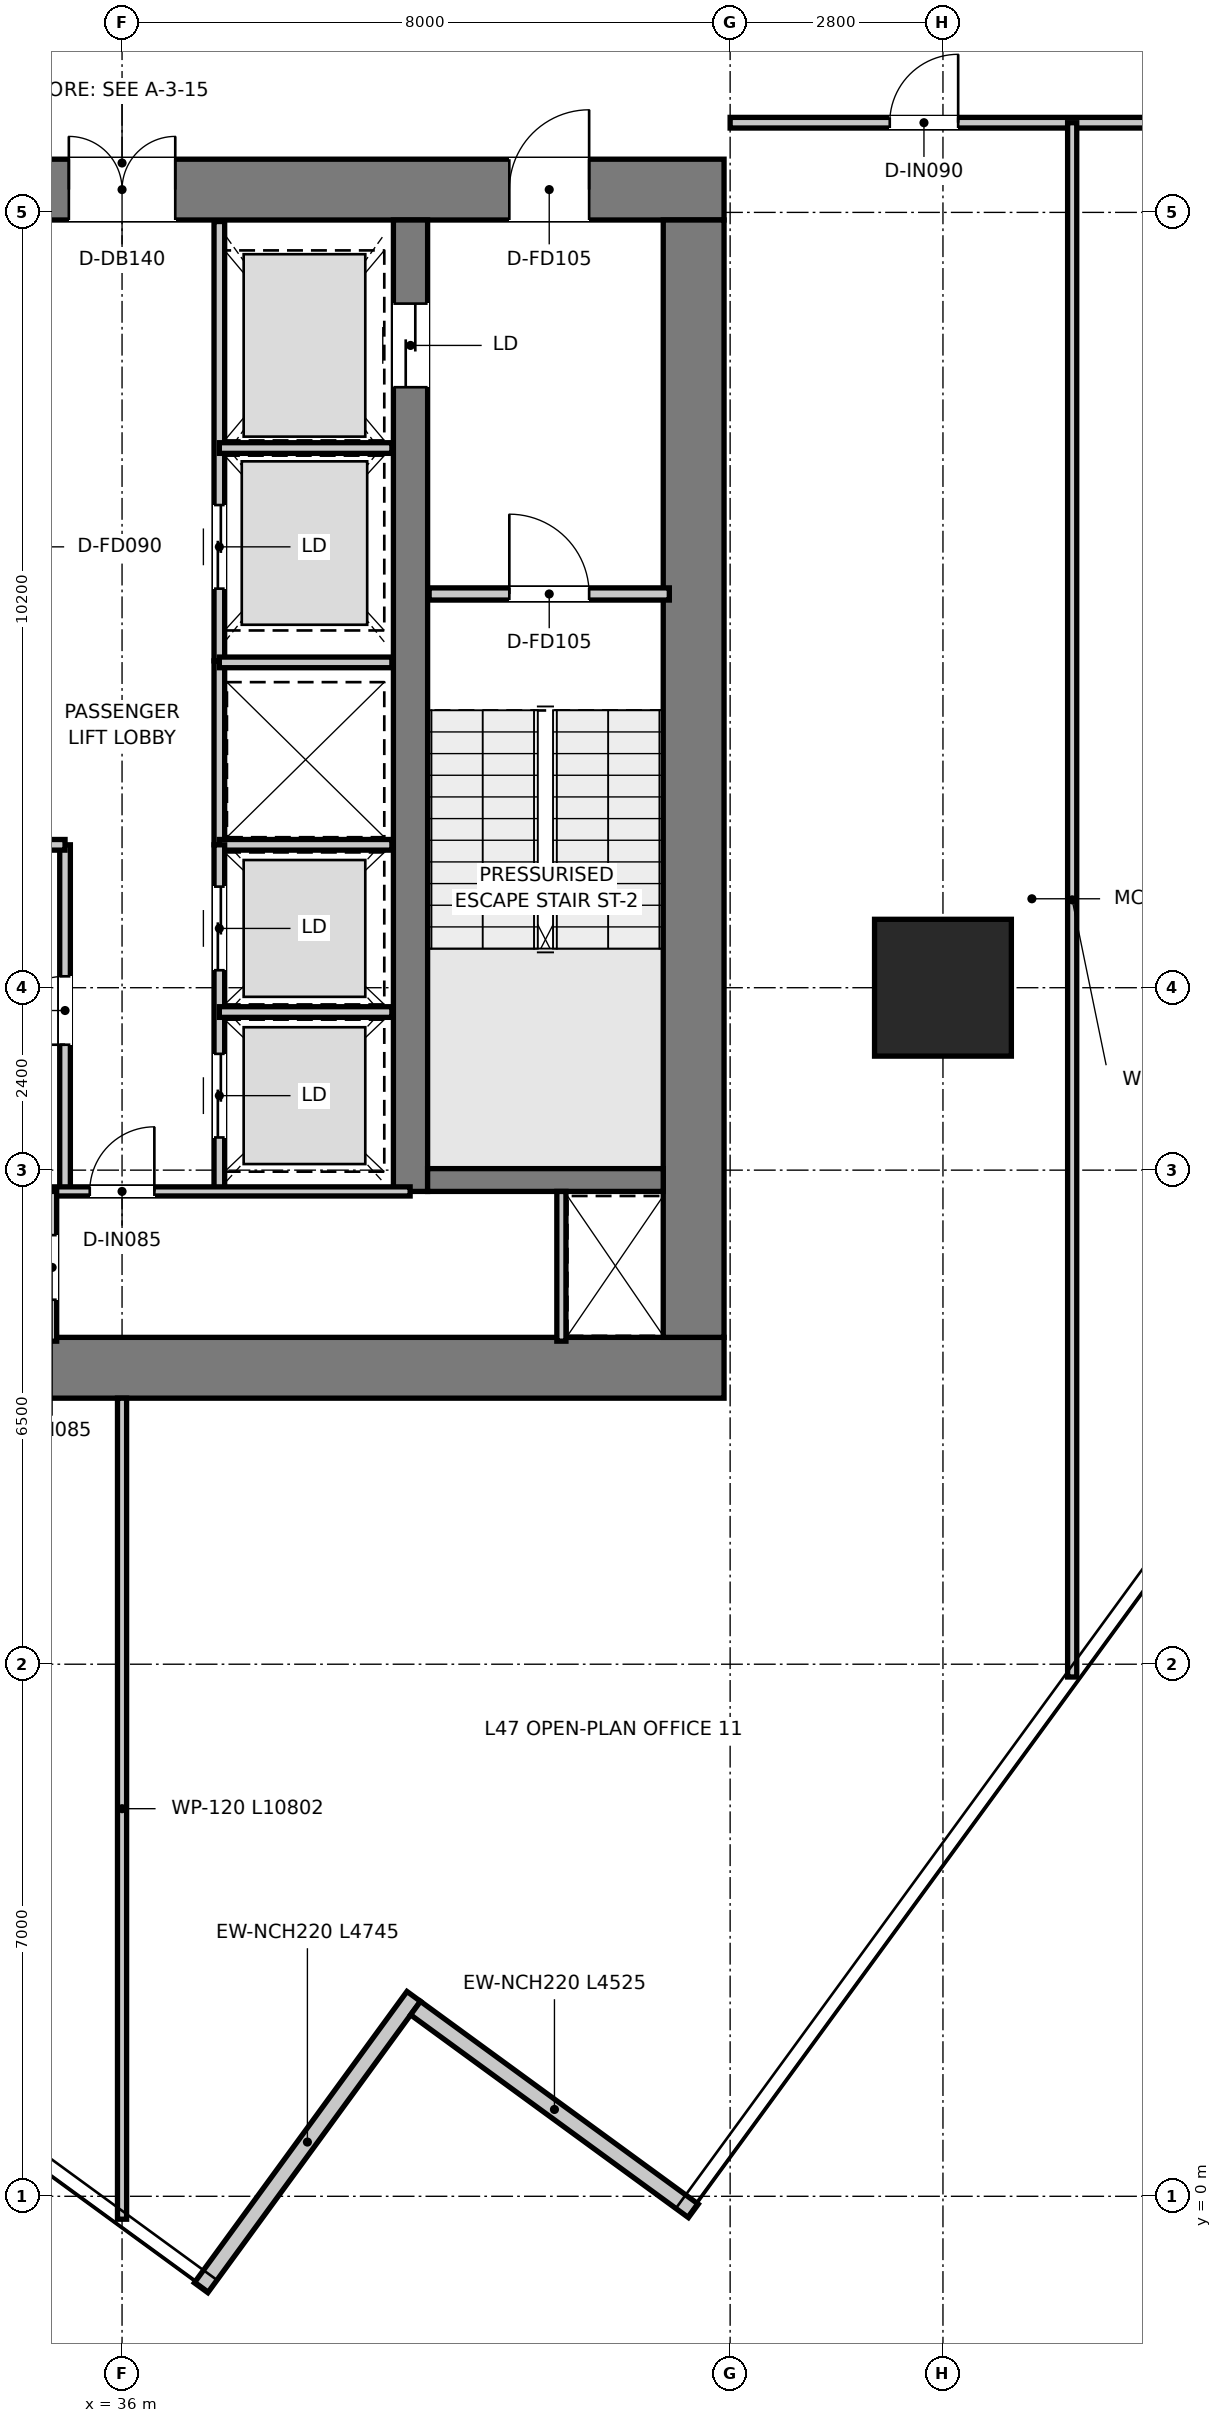
"""IFC4 building model, lengths in metres.
Left out: names, types, materials, properties, quantities, classifications, styles, units other than length and angle.
Written with IfcOpenShell. Run it as: python <this file> out.ifc"""

import sys

from ifc_helpers import new_model, si_unit, direction, frame, frame_2d, origin, origin_2d, place, context, subcontext, project, spatial, rectangle, extrude, source, transform, mapped, element, fill, save


model = new_model("IFC4")
c1 = context("Model", 3, precision=1e-05, world=origin(), true_north=direction((0.0, 1.0)))
c2 = subcontext(c1, "Body", "Model", "MODEL_VIEW")
j1 = project(units=[si_unit("LENGTHUNIT", "METRE"), si_unit("PLANEANGLEUNIT", "RADIAN")], contexts=[c1])
p1 = place(None, origin())
s1 = spatial("IfcSite", under=j1, at=p1, CompositionType="ELEMENT")
p2 = place(p1, origin())
s2 = spatial("IfcBuilding", under=s1, at=p2, CompositionType="ELEMENT")
p3 = place(p2, frame((0.0, 0.0, 193.6)))
s3 = spatial("IfcBuildingStorey", under=s2, at=p3, CompositionType="ELEMENT", Elevation=193.6)
p4 = place(p3, frame((28.08, 10.9, 0.0), z_axis=(0.0, 0.0, 1.0), x_axis=(1.0, 0.0, 0.0)))
e1 = element("IfcWall", 1, at=p4, inside=s3, PredefinedType="SHEAR", context=c2, shape_type="SweptSolid", body=[
    extrude(rectangle(XDim=15.84, YDim=0.8, at=frame_2d((7.92, 0.0))), origin(), (0.0, 0.0, 1.0), 3.95),
])
p5 = place(p3, frame((28.08, 26.4, 0.0), z_axis=(0.0, 0.0, 1.0), x_axis=(1.0, 0.0, 0.0)))
e2 = element("IfcWall", 2, at=p5, inside=s3, PredefinedType="SHEAR", context=c2, shape_type="SweptSolid", body=[
    extrude(rectangle(XDim=15.84, YDim=0.8, at=frame_2d((7.92, 0.0))), origin(), (0.0, 0.0, 1.0), 3.95),
])
p6 = place(p5, frame((7.22, 0.0, 0.0)))
e3 = element("IfcOpeningElement", 3, at=p6, cuts=e2, PredefinedType="OPENING", context=c2, shape_type="SweptSolid", body=[
    extrude(rectangle(XDim=1.4, YDim=2.2, at=frame_2d((0.7, 1.1))), frame((0.0, 0.41, 0.0), z_axis=(0.0, -1.0, 0.0), x_axis=(1.0, 0.0, 0.0)), (0.0, 0.0, 1.0), 0.82),
])
p7 = place(p5, frame((1.775, 0.0, 0.0)))
e4 = element("IfcOpeningElement", 4, at=p7, cuts=e2, PredefinedType="OPENING", context=c2, shape_type="SweptSolid", body=[
    extrude(rectangle(XDim=1.05, YDim=2.1, at=frame_2d((0.525, 1.05))), frame((0.0, 0.41, 0.0), z_axis=(0.0, -1.0, 0.0), x_axis=(1.0, 0.0, 0.0)), (0.0, 0.0, 1.0), 0.82),
])
p8 = place(p5, frame((13.015, 0.0, 0.0)))
e5 = element("IfcOpeningElement", 5, at=p8, cuts=e2, PredefinedType="OPENING", context=c2, shape_type="SweptSolid", body=[
    extrude(rectangle(XDim=1.05, YDim=2.1, at=frame_2d((0.525, 1.05))), frame((0.0, 0.41, 0.0), z_axis=(0.0, -1.0, 0.0), x_axis=(1.0, 0.0, 0.0)), (0.0, 0.0, 1.0), 0.82),
])
p9 = place(p3, frame((43.52, 11.3, 0.0), z_axis=(0.0, 0.0, 1.0), x_axis=(0.0, 1.0, 0.0)))
e6 = element("IfcWall", 6, at=p9, inside=s3, PredefinedType="SHEAR", context=c2, shape_type="SweptSolid", body=[
    extrude(rectangle(XDim=14.7, YDim=0.8, at=frame_2d((7.35, 0.0))), origin(), (0.0, 0.0, 1.0), 3.95),
])
p10 = place(p3, frame((39.795, 13.22, 0.0), z_axis=(0.0, 0.0, 1.0), x_axis=(0.0, 1.0, 0.0)))
e7 = element("IfcWall", 7, at=p10, inside=s3, PredefinedType="SHEAR", context=c2, shape_type="SweptSolid", body=[
    extrude(rectangle(XDim=12.78, YDim=0.45, at=frame_2d((6.39, 0.0))), origin(), (0.0, 0.0, 1.0), 3.95),
])
p11 = place(p10, frame((10.58, 0.0, 0.0)))
e8 = element("IfcOpeningElement", 8, at=p11, cuts=e7, PredefinedType="OPENING", context=c2, shape_type="SweptSolid", body=[
    extrude(rectangle(XDim=1.1, YDim=2.15, at=frame_2d((0.55, 1.075))), frame((0.0, 0.235, 0.0), z_axis=(0.0, -1.0, 0.0), x_axis=(1.0, 0.0, 0.0)), (0.0, 0.0, 1.0), 0.47),
])
p12 = place(p3, frame((40.02, 13.37, 0.0), z_axis=(0.0, 0.0, 1.0), x_axis=(1.0, 0.0, 0.0)))
e9 = element("IfcWall", 9, at=p12, inside=s3, PredefinedType="SHEAR", context=c2, shape_type="SweptSolid", body=[
    extrude(rectangle(XDim=3.1, YDim=0.3, at=frame_2d((1.55, 0.0))), origin(), (0.0, 0.0, 1.0), 3.95),
])
m1 = source(origin(), c2, "Body", "SweptSolid", [
    extrude(rectangle(XDim=1.8, YDim=1.8, at=origin_2d()), origin(), (0.0, 0.0, 1.0), 3.95),
])
p13 = place(p3, frame((46.8, 15.9, 0.0), z_axis=(0.0, 0.0, 1.0), x_axis=(1.0, 0.0, 0.0)))
e10 = element("IfcColumn", 10, at=p13, inside=s3, PredefinedType="USERDEFINED", context=c2, shape_type="MappedRepresentation", body=[
    mapped(m1, transform((0.0, 0.0, 0.0), x_axis=(1.0, 0.0, 0.0), y_axis=(0.0, 1.0, 0.0), z_axis=(0.0, 0.0, 1.0), scale=1.0)),
])
p14 = place(p3, frame((37.04, -1.203, 0.0), z_axis=(0.0, 0.0, 1.0), x_axis=(0.589535308044, 0.807742607871, 0.0)))
e11 = element("IfcWall", 11, at=p14, inside=s3, PredefinedType="ELEMENTEDWALL", context=c2, shape_type="SweptSolid", body=[
    extrude(rectangle(XDim=4.745, YDim=0.22, at=frame_2d((2.373, 0.0))), origin(), (0.0, 0.0, 1.0), 3.67),
])
p15 = place(p3, frame((39.861, 2.476, 0.0), z_axis=(0.0, 0.0, 1.0), x_axis=(0.807734007732, -0.589547091209, 0.0)))
e12 = element("IfcWall", 12, at=p15, inside=s3, PredefinedType="ELEMENTEDWALL", context=c2, shape_type="SweptSolid", body=[
    extrude(rectangle(XDim=4.525, YDim=0.22, at=frame_2d((2.263, 0.0))), origin(), (0.0, 0.0, 1.0), 3.67),
])
p16 = place(p3, frame((40.04, 21.08, 0.0), z_axis=(0.0, 0.0, 1.0), x_axis=(1.0, 0.0, 0.0)))
e13 = element("IfcWall", 13, at=p16, inside=s3, PredefinedType="PARTITIONING", context=c2, shape_type="SweptSolid", body=[
    extrude(rectangle(XDim=3.16, YDim=0.16, at=frame_2d((1.58, 0.0))), origin(), (0.0, 0.0, 1.0), 3.67),
])
p17 = place(p16, frame((1.055, 0.0, 0.0)))
e14 = element("IfcOpeningElement", 14, at=p17, cuts=e13, PredefinedType="OPENING", context=c2, shape_type="SweptSolid", body=[
    extrude(rectangle(XDim=1.05, YDim=2.1, at=frame_2d((0.525, 1.05))), frame((0.0, 0.09, 0.0), z_axis=(0.0, -1.0, 0.0), x_axis=(1.0, 0.0, 0.0)), (0.0, 0.0, 1.0), 0.18),
])
p18 = place(p3, frame((37.28, 20.2, 0.0), z_axis=(0.0, 0.0, 1.0), x_axis=(0.0, 1.0, 0.0)))
e15 = element("IfcWall", 15, at=p18, inside=s3, PredefinedType="PARTITIONING", context=c2, shape_type="SweptSolid", body=[
    extrude(rectangle(XDim=5.78, YDim=0.14, at=frame_2d((2.89, 0.0))), origin(), (0.0, 0.0, 1.0), 2.67),
])
p19 = place(p18, frame((0.95, 0.0, 0.0)))
e16 = element("IfcOpeningElement", 16, at=p19, cuts=e15, PredefinedType="OPENING", context=c2, shape_type="SweptSolid", body=[
    extrude(rectangle(XDim=1.1, YDim=2.15, at=frame_2d((0.55, 1.075))), frame((0.0, 0.08, 0.0), z_axis=(0.0, -1.0, 0.0), x_axis=(1.0, 0.0, 0.0)), (0.0, 0.0, 1.0), 0.16),
])
p20 = place(p3, frame((37.28, 23.0, 0.0), z_axis=(0.0, 0.0, 1.0), x_axis=(1.0, 0.0, 0.0)))
e17 = element("IfcWall", 17, at=p20, inside=s3, PredefinedType="PARTITIONING", context=c2, shape_type="SweptSolid", body=[
    extrude(rectangle(XDim=2.27, YDim=0.14, at=frame_2d((1.135, 0.0))), origin(), (0.0, 0.0, 1.0), 2.67),
])
p21 = place(p3, frame((37.28, 17.78, 0.0), z_axis=(0.0, 0.0, 1.0), x_axis=(0.0, 1.0, 0.0)))
e18 = element("IfcWall", 18, at=p21, inside=s3, PredefinedType="PARTITIONING", context=c2, shape_type="SweptSolid", body=[
    extrude(rectangle(XDim=2.42, YDim=0.14, at=frame_2d((1.21, 0.0))), origin(), (0.0, 0.0, 1.0), 3.67),
])
for number, where, z_axis, x_axis in (
    (19, (37.28, 17.78, 0.0), (0.0, 0.0, 1.0), (1.0, 0.0, 0.0)),
    (20, (37.28, 20.18, 0.0), (0.0, 0.0, 1.0), (1.0, 0.0, 0.0)),
):
    element("IfcWall", number, at=place(p3, frame(where, z_axis=z_axis, x_axis=x_axis)), inside=s3, PredefinedType="PARTITIONING", context=c2, shape_type="SweptSolid", body=[
        extrude(rectangle(XDim=2.27, YDim=0.14, at=frame_2d((1.135, 0.0))), origin(), (0.0, 0.0, 1.0), 3.67),
    ])
p22 = place(p3, frame((35.25, 13.22, 0.0), z_axis=(0.0, 0.0, 1.0), x_axis=(0.0, 1.0, 0.0)))
e21 = element("IfcWall", 21, at=p22, inside=s3, PredefinedType="PARTITIONING", context=c2, shape_type="SweptSolid", body=[
    extrude(rectangle(XDim=4.56, YDim=0.14, at=frame_2d((2.28, 0.0))), origin(), (0.0, 0.0, 1.0), 3.67),
])
p23 = place(p22, frame((1.93, 0.0, 0.0)))
e22 = element("IfcOpeningElement", 22, at=p23, cuts=e21, PredefinedType="OPENING", context=c2, shape_type="SweptSolid", body=[
    extrude(rectangle(XDim=0.9, YDim=2.1, at=frame_2d((0.45, 1.05))), frame((0.0, 0.08, 0.0), z_axis=(0.0, -1.0, 0.0), x_axis=(1.0, 0.0, 0.0)), (0.0, 0.0, 1.0), 0.16),
])
p24 = place(p3, frame((34.72, 17.78, 0.0), z_axis=(0.0, 0.0, 1.0), x_axis=(1.0, 0.0, 0.0)))
e23 = element("IfcWall", 23, at=p24, inside=s3, PredefinedType="PARTITIONING", context=c2, shape_type="SweptSolid", body=[
    extrude(rectangle(XDim=0.53, YDim=0.14, at=frame_2d((0.265, 0.0))), origin(), (0.0, 0.0, 1.0), 3.67),
])
p25 = place(p3, frame((37.28, 13.22, 0.0), z_axis=(0.0, 0.0, 1.0), x_axis=(0.0, 1.0, 0.0)))
e24 = element("IfcWall", 24, at=p25, inside=s3, PredefinedType="PARTITIONING", context=c2, shape_type="SweptSolid", body=[
    extrude(rectangle(XDim=4.56, YDim=0.14, at=frame_2d((2.28, 0.0))), origin(), (0.0, 0.0, 1.0), 3.67),
])
p26 = place(p25, frame((0.71, 0.0, 0.0)))
e25 = element("IfcOpeningElement", 25, at=p26, cuts=e24, PredefinedType="OPENING", context=c2, shape_type="SweptSolid", body=[
    extrude(rectangle(XDim=1.1, YDim=2.15, at=frame_2d((0.55, 1.075))), frame((0.0, 0.08, 0.0), z_axis=(0.0, -1.0, 0.0), x_axis=(1.0, 0.0, 0.0)), (0.0, 0.0, 1.0), 0.16),
])
p27 = place(p25, frame((2.91, 0.0, 0.0)))
e26 = element("IfcOpeningElement", 26, at=p27, cuts=e24, PredefinedType="OPENING", context=c2, shape_type="SweptSolid", body=[
    extrude(rectangle(XDim=1.1, YDim=2.15, at=frame_2d((0.55, 1.075))), frame((0.0, 0.08, 0.0), z_axis=(0.0, -1.0, 0.0), x_axis=(1.0, 0.0, 0.0)), (0.0, 0.0, 1.0), 0.16),
])
p28 = place(p3, frame((37.28, 15.58, 0.0), z_axis=(0.0, 0.0, 1.0), x_axis=(1.0, 0.0, 0.0)))
e27 = element("IfcWall", 27, at=p28, inside=s3, PredefinedType="PARTITIONING", context=c2, shape_type="SweptSolid", body=[
    extrude(rectangle(XDim=2.27, YDim=0.14, at=frame_2d((1.135, 0.0))), origin(), (0.0, 0.0, 1.0), 3.67),
])
p29 = place(p3, frame((41.78, 11.25, 0.0), z_axis=(0.0, 0.0, 1.0), x_axis=(0.0, 1.0, 0.0)))
e28 = element("IfcWall", 28, at=p29, inside=s3, PredefinedType="PARTITIONING", context=c2, shape_type="SweptSolid", body=[
    extrude(rectangle(XDim=1.97, YDim=0.12, at=frame_2d((0.985, 0.0))), origin(), (0.0, 0.0, 1.0), 3.67),
])
p30 = place(p3, frame((32.21, 13.22, 0.0), z_axis=(0.0, 0.0, 1.0), x_axis=(1.0, 0.0, 0.0)))
e29 = element("IfcWall", 29, at=p30, inside=s3, PredefinedType="PARTITIONING", context=c2, shape_type="SweptSolid", body=[
    extrude(rectangle(XDim=7.58, YDim=0.12, at=frame_2d((3.79, 0.0))), origin(), (0.0, 0.0, 1.0), 3.67),
])
p31 = place(p30, frame((3.365, 0.0, 0.0)))
e30 = element("IfcOpeningElement", 30, at=p31, cuts=e29, PredefinedType="OPENING", context=c2, shape_type="SweptSolid", body=[
    extrude(rectangle(XDim=0.85, YDim=2.1, at=frame_2d((0.425, 1.05))), frame((0.0, 0.07, 0.0), z_axis=(0.0, -1.0, 0.0), x_axis=(1.0, 0.0, 0.0)), (0.0, 0.0, 1.0), 0.14),
])
p32 = place(p3, frame((35.08, 11.25, 0.0), z_axis=(0.0, 0.0, 1.0), x_axis=(0.0, 1.0, 0.0)))
e31 = element("IfcWall", 31, at=p32, inside=s3, PredefinedType="PARTITIONING", context=c2, shape_type="SweptSolid", body=[
    extrude(rectangle(XDim=1.97, YDim=0.12, at=frame_2d((0.985, 0.0))), origin(), (0.0, 0.0, 1.0), 3.67),
])
p33 = place(p32, frame((0.545, 0.0, 0.0)))
e32 = element("IfcOpeningElement", 32, at=p33, cuts=e31, PredefinedType="OPENING", context=c2, shape_type="SweptSolid", body=[
    extrude(rectangle(XDim=0.85, YDim=2.1, at=frame_2d((0.425, 1.05))), frame((0.0, 0.07, 0.0), z_axis=(0.0, -1.0, 0.0), x_axis=(1.0, 0.0, 0.0)), (0.0, 0.0, 1.0), 0.14),
])
p34 = place(p3, frame((44.0, 27.28, 0.0), z_axis=(0.0, 0.0, 1.0), x_axis=(1.0, 0.0, 0.0)))
e33 = element("IfcWall", 33, at=p34, inside=s3, PredefinedType="PARTITIONING", context=c2, shape_type="SweptSolid", body=[
    extrude(rectangle(XDim=19.425, YDim=0.14, at=frame_2d((9.712, 0.0))), origin(), (0.0, 0.0, 1.0), 3.03),
])
p35 = place(p34, frame((2.1, 0.0, 0.0)))
e34 = element("IfcOpeningElement", 34, at=p35, cuts=e33, PredefinedType="OPENING", context=c2, shape_type="SweptSolid", body=[
    extrude(rectangle(XDim=0.9, YDim=2.1, at=frame_2d((0.45, 1.05))), frame((0.0, 0.08, 0.0), z_axis=(0.0, -1.0, 0.0), x_axis=(1.0, 0.0, 0.0)), (0.0, 0.0, 1.0), 0.16),
])
p36 = place(p34, frame((11.22, 0.0, 0.0)))
e35 = element("IfcOpeningElement", 35, at=p36, cuts=e33, PredefinedType="OPENING", context=c2, shape_type="SweptSolid", body=[
    extrude(rectangle(XDim=0.9, YDim=2.1, at=frame_2d((0.45, 1.05))), frame((0.0, 0.08, 0.0), z_axis=(0.0, -1.0, 0.0), x_axis=(1.0, 0.0, 0.0)), (0.0, 0.0, 1.0), 0.16),
])
p37 = place(p3, frame((36.0, -0.302, 0.0), z_axis=(0.0, 0.0, 1.0), x_axis=(0.0, 1.0, 0.0)))
e36 = element("IfcWall", 36, at=p37, inside=s3, PredefinedType="PARTITIONING", context=c2, shape_type="SweptSolid", body=[
    extrude(rectangle(XDim=10.802, YDim=0.12, at=frame_2d((5.401, 0.0))), origin(), (0.0, 0.0, 1.0), 3.67),
])
p38 = place(p3, frame((48.5, 6.832, 0.0), z_axis=(0.0, 0.0, 1.0), x_axis=(0.0, 1.0, 0.0)))
e37 = element("IfcWall", 37, at=p38, inside=s3, PredefinedType="PARTITIONING", context=c2, shape_type="SweptSolid", body=[
    extrude(rectangle(XDim=20.448, YDim=0.12, at=frame_2d((10.224, 0.0))), origin(), (0.0, 0.0, 1.0), 3.08),
])
p39 = place(p17, origin())
e38 = element("IfcDoor", 38, at=p39, inside=s3, OperationType="SINGLE_SWING_LEFT", PredefinedType="DOOR", context=c2, shape_type="SweptSolid", body=[
    extrude(rectangle(XDim=1.05, YDim=2.1, at=frame_2d((0.525, 1.05))), frame((0.0, 0.025, 0.0), z_axis=(0.0, -1.0, 0.0), x_axis=(1.0, 0.0, 0.0)), (0.0, 0.0, 1.0), 0.05),
])
fill(e14, e38)
p40 = place(p6, origin())
e39 = element("IfcDoor", 39, at=p40, inside=s3, OperationType="DOUBLE_DOOR_SINGLE_SWING", PredefinedType="DOOR", context=c2, shape_type="SweptSolid", body=[
    extrude(rectangle(XDim=1.4, YDim=2.2, at=frame_2d((0.7, 1.1))), frame((0.0, 0.025, 0.0), z_axis=(0.0, -1.0, 0.0), x_axis=(1.0, 0.0, 0.0)), (0.0, 0.0, 1.0), 0.05),
])
fill(e3, e39)
p41 = place(p8, origin())
e40 = element("IfcDoor", 40, at=p41, inside=s3, OperationType="SINGLE_SWING_RIGHT", PredefinedType="DOOR", context=c2, shape_type="SweptSolid", body=[
    extrude(rectangle(XDim=1.05, YDim=2.1, at=frame_2d((0.525, 1.05))), frame((0.0, 0.025, 0.0), z_axis=(0.0, -1.0, 0.0), x_axis=(1.0, 0.0, 0.0)), (0.0, 0.0, 1.0), 0.05),
])
fill(e5, e40)
p42 = place(p11, origin())
e41 = element("IfcDoor", 41, at=p42, inside=s3, OperationType="DOUBLE_DOOR_SLIDING", PredefinedType="DOOR", context=c2, shape_type="SweptSolid", body=[
    extrude(rectangle(XDim=1.1, YDim=2.15, at=frame_2d((0.55, 1.075))), frame((0.0, 0.025, 0.0), z_axis=(0.0, -1.0, 0.0), x_axis=(1.0, 0.0, 0.0)), (0.0, 0.0, 1.0), 0.05),
])
fill(e8, e41)
p43 = place(p19, origin())
e42 = element("IfcDoor", 42, at=p43, inside=s3, OperationType="DOUBLE_DOOR_SLIDING", PredefinedType="DOOR", context=c2, shape_type="SweptSolid", body=[
    extrude(rectangle(XDim=1.1, YDim=2.15, at=frame_2d((0.55, 1.075))), frame((0.0, 0.025, 0.0), z_axis=(0.0, -1.0, 0.0), x_axis=(1.0, 0.0, 0.0)), (0.0, 0.0, 1.0), 0.05),
])
fill(e16, e42)
p44 = place(p23, origin())
e43 = element("IfcDoor", 43, at=p44, inside=s3, OperationType="SINGLE_SWING_LEFT", PredefinedType="DOOR", context=c2, shape_type="SweptSolid", body=[
    extrude(rectangle(XDim=0.9, YDim=2.1, at=frame_2d((0.45, 1.05))), frame((0.0, 0.025, 0.0), z_axis=(0.0, -1.0, 0.0), x_axis=(1.0, 0.0, 0.0)), (0.0, 0.0, 1.0), 0.05),
])
fill(e22, e43)
p45 = place(p26, origin())
e44 = element("IfcDoor", 44, at=p45, inside=s3, OperationType="DOUBLE_DOOR_SLIDING", PredefinedType="DOOR", context=c2, shape_type="SweptSolid", body=[
    extrude(rectangle(XDim=1.1, YDim=2.15, at=frame_2d((0.55, 1.075))), frame((0.0, 0.025, 0.0), z_axis=(0.0, -1.0, 0.0), x_axis=(1.0, 0.0, 0.0)), (0.0, 0.0, 1.0), 0.05),
])
fill(e25, e44)
p46 = place(p27, origin())
e45 = element("IfcDoor", 45, at=p46, inside=s3, OperationType="DOUBLE_DOOR_SLIDING", PredefinedType="DOOR", context=c2, shape_type="SweptSolid", body=[
    extrude(rectangle(XDim=1.1, YDim=2.15, at=frame_2d((0.55, 1.075))), frame((0.0, 0.025, 0.0), z_axis=(0.0, -1.0, 0.0), x_axis=(1.0, 0.0, 0.0)), (0.0, 0.0, 1.0), 0.05),
])
fill(e26, e45)
p47 = place(p31, origin())
e46 = element("IfcDoor", 46, at=p47, inside=s3, OperationType="SINGLE_SWING_RIGHT", PredefinedType="DOOR", context=c2, shape_type="SweptSolid", body=[
    extrude(rectangle(XDim=0.85, YDim=2.1, at=frame_2d((0.425, 1.05))), frame((0.0, 0.025, 0.0), z_axis=(0.0, -1.0, 0.0), x_axis=(1.0, 0.0, 0.0)), (0.0, 0.0, 1.0), 0.05),
])
fill(e30, e46)
p48 = place(p33, origin())
e47 = element("IfcDoor", 47, at=p48, inside=s3, OperationType="SINGLE_SWING_LEFT", PredefinedType="DOOR", context=c2, shape_type="SweptSolid", body=[
    extrude(rectangle(XDim=0.85, YDim=2.1, at=frame_2d((0.425, 1.05))), frame((0.0, 0.025, 0.0), z_axis=(0.0, -1.0, 0.0), x_axis=(1.0, 0.0, 0.0)), (0.0, 0.0, 1.0), 0.05),
])
fill(e32, e47)
p49 = place(p35, origin())
e48 = element("IfcDoor", 48, at=p49, inside=s3, OperationType="SINGLE_SWING_RIGHT", PredefinedType="DOOR", context=c2, shape_type="SweptSolid", body=[
    extrude(rectangle(XDim=0.9, YDim=2.1, at=frame_2d((0.45, 1.05))), frame((0.0, 0.025, 0.0), z_axis=(0.0, -1.0, 0.0), x_axis=(1.0, 0.0, 0.0)), (0.0, 0.0, 1.0), 0.05),
])
fill(e34, e48)
save(model, sys.argv[1])
